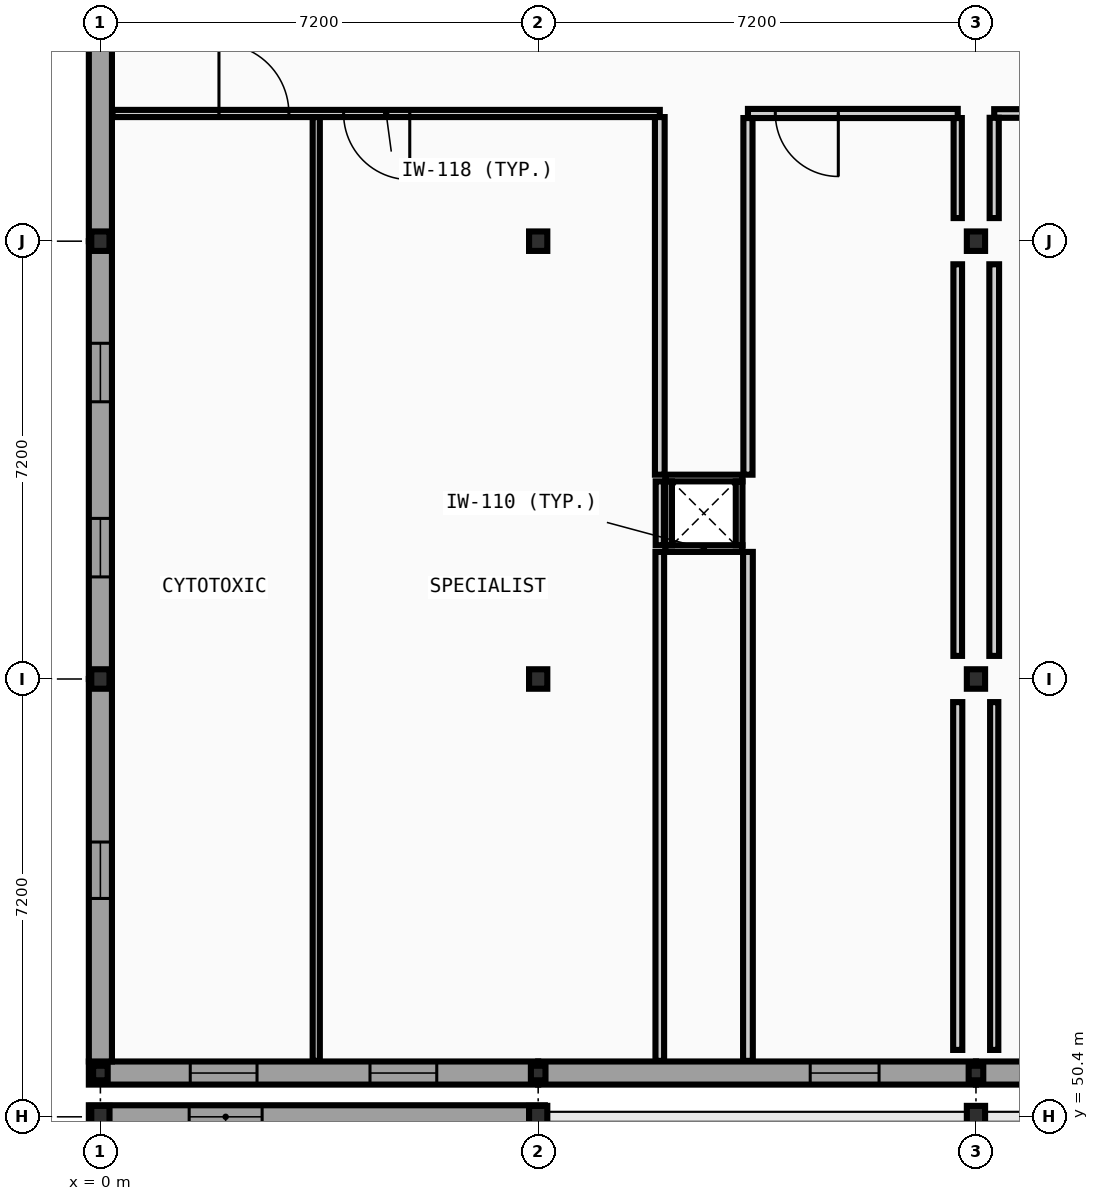
"""IFC4 building model, lengths in metres.
Left out: names, types, materials, properties, quantities, classifications, styles, units other than length and angle.
Written with IfcOpenShell. Run it as: python <this file> out.ifc"""

import sys

from ifc_helpers import new_model, si_unit, direction, frame, frame_2d, origin, origin_2d, place, context, subcontext, project, spatial, rectangle, i_section, extrude, element, fill, save


model = new_model("IFC4")
c1 = context("Model", 3, precision=1e-05, world=origin(), true_north=direction((0.0, 1.0)))
c2 = subcontext(c1, "Body", "Model", "MODEL_VIEW")
j1 = project(units=[si_unit("LENGTHUNIT", "METRE"), si_unit("PLANEANGLEUNIT", "RADIAN")], contexts=[c1])
p1 = place(None, origin())
s1 = spatial("IfcSite", under=j1, at=p1, CompositionType="ELEMENT")
p2 = place(p1, origin())
s2 = spatial("IfcBuilding", under=s1, at=p2, CompositionType="ELEMENT")
p3 = place(p2, frame((0.0, 0.0, 9.6)))
s3 = spatial("IfcBuildingStorey", under=s2, at=p3, CompositionType="ELEMENT", Elevation=9.6)
p4 = place(p3, frame((0.0, 50.4, 0.0), z_axis=(0.0, 0.0, 1.0), x_axis=(1.0, 0.0, 0.0)))
e1 = element("IfcColumn", 1, at=p4, inside=s3, PredefinedType="COLUMN", context=c2, shape_type="SweptSolid", body=[
    extrude(i_section(OverallWidth=0.3, OverallDepth=0.36, WebThickness=0.012, FlangeThickness=0.022, FilletRadius=0.027, at=origin_2d()), origin(), (0.0, 0.0, 1.0), 4.4),
])
p5 = place(p3, frame((0.0, 51.12, 0.0), z_axis=(0.0, 0.0, 1.0), x_axis=(1.0, 0.0, 0.0)))
e2 = element("IfcColumn", 2, at=p5, inside=s3, PredefinedType="COLUMN", context=c2, shape_type="SweptSolid", body=[
    extrude(i_section(OverallWidth=0.24, OverallDepth=0.24, WebThickness=0.01, FlangeThickness=0.017, FilletRadius=0.021, at=origin_2d()), origin(), (0.0, 0.0, 1.0), 4.4),
])
for number, where, z_axis, x_axis in (
    (3, (0.0, 57.6, 0.0), (0.0, 0.0, 1.0), (1.0, 0.0, 0.0)),
    (4, (0.0, 64.8, 0.0), (0.0, 0.0, 1.0), (1.0, 0.0, 0.0)),
):
    element("IfcColumn", number, at=place(p3, frame(where, z_axis=z_axis, x_axis=x_axis)), inside=s3, PredefinedType="COLUMN", context=c2, shape_type="SweptSolid", body=[
        extrude(i_section(OverallWidth=0.3, OverallDepth=0.32, WebThickness=0.011, FlangeThickness=0.021, FilletRadius=0.027, at=origin_2d()), origin(), (0.0, 0.0, 1.0), 4.4),
    ])
p6 = place(p3, frame((7.2, 50.4, 0.0), z_axis=(0.0, 0.0, 1.0), x_axis=(1.0, 0.0, 0.0)))
e5 = element("IfcColumn", 5, at=p6, inside=s3, PredefinedType="COLUMN", context=c2, shape_type="SweptSolid", body=[
    extrude(i_section(OverallWidth=0.3, OverallDepth=0.36, WebThickness=0.012, FlangeThickness=0.022, FilletRadius=0.027, at=origin_2d()), origin(), (0.0, 0.0, 1.0), 4.4),
])
p7 = place(p3, frame((7.2, 51.12, 0.0), z_axis=(0.0, 0.0, 1.0), x_axis=(1.0, 0.0, 0.0)))
e6 = element("IfcColumn", 6, at=p7, inside=s3, PredefinedType="COLUMN", context=c2, shape_type="SweptSolid", body=[
    extrude(i_section(OverallWidth=0.24, OverallDepth=0.24, WebThickness=0.01, FlangeThickness=0.017, FilletRadius=0.021, at=origin_2d()), origin(), (0.0, 0.0, 1.0), 4.4),
])
for number, where, z_axis, x_axis in (
    (7, (7.2, 57.6, 0.0), (0.0, 0.0, 1.0), (1.0, 0.0, 0.0)),
    (8, (7.2, 64.8, 0.0), (0.0, 0.0, 1.0), (1.0, 0.0, 0.0)),
):
    element("IfcColumn", number, at=place(p3, frame(where, z_axis=z_axis, x_axis=x_axis)), inside=s3, PredefinedType="COLUMN", context=c2, shape_type="SweptSolid", body=[
        extrude(i_section(OverallWidth=0.3, OverallDepth=0.32, WebThickness=0.011, FlangeThickness=0.021, FilletRadius=0.027, at=origin_2d()), origin(), (0.0, 0.0, 1.0), 4.4),
    ])
p8 = place(p3, frame((14.4, 50.4, 0.0), z_axis=(0.0, 0.0, 1.0), x_axis=(1.0, 0.0, 0.0)))
e9 = element("IfcColumn", 9, at=p8, inside=s3, PredefinedType="COLUMN", context=c2, shape_type="SweptSolid", body=[
    extrude(i_section(OverallWidth=0.3, OverallDepth=0.36, WebThickness=0.012, FlangeThickness=0.022, FilletRadius=0.027, at=origin_2d()), origin(), (0.0, 0.0, 1.0), 4.4),
])
p9 = place(p3, frame((14.4, 51.12, 0.0), z_axis=(0.0, 0.0, 1.0), x_axis=(1.0, 0.0, 0.0)))
e10 = element("IfcColumn", 10, at=p9, inside=s3, PredefinedType="COLUMN", context=c2, shape_type="SweptSolid", body=[
    extrude(i_section(OverallWidth=0.24, OverallDepth=0.24, WebThickness=0.01, FlangeThickness=0.017, FilletRadius=0.021, at=origin_2d()), origin(), (0.0, 0.0, 1.0), 4.4),
])
for number, where, z_axis, x_axis in (
    (11, (14.4, 57.6, 0.0), (0.0, 0.0, 1.0), (1.0, 0.0, 0.0)),
    (12, (14.4, 64.8, 0.0), (0.0, 0.0, 1.0), (1.0, 0.0, 0.0)),
):
    element("IfcColumn", number, at=place(p3, frame(where, z_axis=z_axis, x_axis=x_axis)), inside=s3, PredefinedType="COLUMN", context=c2, shape_type="SweptSolid", body=[
        extrude(i_section(OverallWidth=0.3, OverallDepth=0.32, WebThickness=0.011, FlangeThickness=0.021, FilletRadius=0.027, at=origin_2d()), origin(), (0.0, 0.0, 1.0), 4.4),
    ])
p10 = place(p3, frame((7.31, 50.4, 0.0), z_axis=(0.0, 0.0, 1.0), x_axis=(-1.0, 0.0, 0.0)))
e13 = element("IfcWall", 13, at=p10, inside=s3, PredefinedType="STANDARD", context=c2, shape_type="SweptSolid", body=[
    extrude(rectangle(XDim=7.5, YDim=0.38, at=frame_2d((3.75, 0.0))), origin(), (0.0, 0.0, 1.0), 3.895),
])
p11 = place(p10, frame((4.65, 0.0, 0.95)))
e14 = element("IfcOpeningElement", 14, at=p11, cuts=e13, PredefinedType="OPENING", context=c2, shape_type="SweptSolid", body=[
    extrude(rectangle(XDim=1.2, YDim=1.296, at=frame_2d((0.6, 0.648))), frame((0.0, 0.2, 0.0), z_axis=(0.0, -1.0, 0.0), x_axis=(1.0, 0.0, 0.0)), (0.0, 0.0, 1.0), 0.4),
])
p12 = place(p3, frame((-0.19, 51.12, 0.0), z_axis=(0.0, 0.0, 1.0), x_axis=(1.0, 0.0, 0.0)))
e15 = element("IfcWall", 15, at=p12, inside=s3, PredefinedType="STANDARD", context=c2, shape_type="SweptSolid", body=[
    extrude(rectangle(XDim=7.39, YDim=0.38, at=frame_2d((3.695, 0.0))), origin(), (0.0, 0.0, 1.0), 3.875),
])
p13 = place(p12, frame((1.668, 0.0, 0.95)))
e16 = element("IfcOpeningElement", 16, at=p13, cuts=e15, PredefinedType="OPENING", context=c2, shape_type="SweptSolid", body=[
    extrude(rectangle(XDim=1.098, YDim=1.26, at=frame_2d((0.549, 0.63))), frame((0.0, 0.2, 0.0), z_axis=(0.0, -1.0, 0.0), x_axis=(1.0, 0.0, 0.0)), (0.0, 0.0, 1.0), 0.4),
])
p14 = place(p12, frame((4.624, 0.0, 0.95)))
e17 = element("IfcOpeningElement", 17, at=p14, cuts=e15, PredefinedType="OPENING", context=c2, shape_type="SweptSolid", body=[
    extrude(rectangle(XDim=1.098, YDim=1.26, at=frame_2d((0.549, 0.63))), frame((0.0, 0.2, 0.0), z_axis=(0.0, -1.0, 0.0), x_axis=(1.0, 0.0, 0.0)), (0.0, 0.0, 1.0), 0.4),
])
p15 = place(p3, frame((7.2, 51.12, 0.0), z_axis=(0.0, 0.0, 1.0), x_axis=(1.0, 0.0, 0.0)))
e18 = element("IfcWall", 18, at=p15, inside=s3, PredefinedType="STANDARD", context=c2, shape_type="SweptSolid", body=[
    extrude(rectangle(XDim=7.2, YDim=0.38, at=frame_2d((3.6, 0.0))), origin(), (0.0, 0.0, 1.0), 3.875),
])
p16 = place(p15, frame((4.474, 0.0, 0.95)))
e19 = element("IfcOpeningElement", 19, at=p16, cuts=e18, PredefinedType="OPENING", context=c2, shape_type="SweptSolid", body=[
    extrude(rectangle(XDim=1.132, YDim=1.26, at=frame_2d((0.566, 0.63))), frame((0.0, 0.2, 0.0), z_axis=(0.0, -1.0, 0.0), x_axis=(1.0, 0.0, 0.0)), (0.0, 0.0, 1.0), 0.4),
])
p17 = place(p3, frame((14.4, 51.12, 0.0), z_axis=(0.0, 0.0, 1.0), x_axis=(1.0, 0.0, 0.0)))
e20 = element("IfcWall", 20, at=p17, inside=s3, PredefinedType="STANDARD", context=c2, shape_type="SweptSolid", body=[
    extrude(rectangle(XDim=7.2, YDim=0.38, at=frame_2d((3.6, 0.0))), origin(), (0.0, 0.0, 1.0), 3.875),
])
p18 = place(p17, frame((1.577, 0.0, 0.95)))
e21 = element("IfcOpeningElement", 21, at=p18, cuts=e20, PredefinedType="OPENING", context=c2, shape_type="SweptSolid", body=[
    extrude(rectangle(XDim=1.166, YDim=1.26, at=frame_2d((0.583, 0.63))), frame((0.0, 0.2, 0.0), z_axis=(0.0, -1.0, 0.0), x_axis=(1.0, 0.0, 0.0)), (0.0, 0.0, 1.0), 0.4),
])
p19 = place(p3, frame((0.0, 57.6, 0.0), z_axis=(0.0, 0.0, 1.0), x_axis=(0.0, -1.0, 0.0)))
e22 = element("IfcWall", 22, at=p19, inside=s3, PredefinedType="STANDARD", context=c2, shape_type="SweptSolid", body=[
    extrude(rectangle(XDim=6.29, YDim=0.38, at=frame_2d((3.145, 0.0))), origin(), (0.0, 0.0, 1.0), 3.865),
])
p20 = place(p19, frame((2.681, 0.0, 0.95)))
e23 = element("IfcOpeningElement", 23, at=p20, cuts=e22, PredefinedType="OPENING", context=c2, shape_type="SweptSolid", body=[
    extrude(rectangle(XDim=0.928, YDim=1.296, at=frame_2d((0.464, 0.648))), frame((0.0, 0.2, 0.0), z_axis=(0.0, -1.0, 0.0), x_axis=(1.0, 0.0, 0.0)), (0.0, 0.0, 1.0), 0.4),
])
p21 = place(p3, frame((0.0, 64.8, 0.0), z_axis=(0.0, 0.0, 1.0), x_axis=(0.0, -1.0, 0.0)))
e24 = element("IfcWall", 24, at=p21, inside=s3, PredefinedType="STANDARD", context=c2, shape_type="SweptSolid", body=[
    extrude(rectangle(XDim=7.2, YDim=0.38, at=frame_2d((3.6, 0.0))), origin(), (0.0, 0.0, 1.0), 3.885),
])
p22 = place(p21, frame((1.679, 0.0, 0.95)))
e25 = element("IfcOpeningElement", 25, at=p22, cuts=e24, PredefinedType="OPENING", context=c2, shape_type="SweptSolid", body=[
    extrude(rectangle(XDim=0.962, YDim=1.296, at=frame_2d((0.481, 0.648))), frame((0.0, 0.2, 0.0), z_axis=(0.0, -1.0, 0.0), x_axis=(1.0, 0.0, 0.0)), (0.0, 0.0, 1.0), 0.4),
])
p23 = place(p21, frame((4.559, 0.0, 0.95)))
e26 = element("IfcOpeningElement", 26, at=p23, cuts=e24, PredefinedType="OPENING", context=c2, shape_type="SweptSolid", body=[
    extrude(rectangle(XDim=0.962, YDim=1.296, at=frame_2d((0.481, 0.648))), frame((0.0, 0.2, 0.0), z_axis=(0.0, -1.0, 0.0), x_axis=(1.0, 0.0, 0.0)), (0.0, 0.0, 1.0), 0.4),
])
p24 = place(p3, frame((0.0, 72.0, 0.0), z_axis=(0.0, 0.0, 1.0), x_axis=(0.0, -1.0, 0.0)))
e27 = element("IfcWall", 27, at=p24, inside=s3, PredefinedType="STANDARD", context=c2, shape_type="SweptSolid", body=[
    extrude(rectangle(XDim=7.2, YDim=0.38, at=frame_2d((3.6, 0.0))), origin(), (0.0, 0.0, 1.0), 3.885),
])
for number, where, z_axis, x_axis in (
    (28, (9.29, 59.745, 0.0), (0.0, 0.0, 1.0), (1.0, 0.0, 0.0)),
    (29, (9.29, 60.905, 0.0), (0.0, 0.0, 1.0), (1.0, 0.0, 0.0)),
):
    element("IfcWall", number, at=place(p3, frame(where, z_axis=z_axis, x_axis=x_axis)), inside=s3, PredefinedType="PARTITIONING", context=c2, shape_type="SweptSolid", body=[
        extrude(rectangle(XDim=1.27, YDim=0.11, at=frame_2d((0.635, 0.0))), origin(), (0.0, 0.0, 1.0), 4.2),
    ])
for number, where, z_axis, x_axis in (
    (30, (9.345, 59.8, 0.0), (0.0, 0.0, 1.0), (0.0, 1.0, 0.0)),
    (31, (10.505, 59.8, 0.0), (0.0, 0.0, 1.0), (0.0, 1.0, 0.0)),
):
    element("IfcWall", number, at=place(p3, frame(where, z_axis=z_axis, x_axis=x_axis)), inside=s3, PredefinedType="PARTITIONING", context=c2, shape_type="SweptSolid", body=[
        extrude(rectangle(XDim=1.05, YDim=0.11, at=frame_2d((0.525, 0.0))), origin(), (0.0, 0.0, 1.0), 4.2),
    ])
p25 = place(p3, frame((0.2, 66.9, 0.0), z_axis=(0.0, 0.0, 1.0), x_axis=(1.0, 0.0, 0.0)))
e32 = element("IfcWall", 32, at=p25, inside=s3, PredefinedType="PARTITIONING", context=c2, shape_type="SweptSolid", body=[
    extrude(rectangle(XDim=9.0, YDim=0.118, at=frame_2d((4.5, 0.0))), origin(), (0.0, 0.0, 1.0), 4.2),
])
p26 = place(p25, frame((1.75, 0.0, 0.0)))
e33 = element("IfcOpeningElement", 33, at=p26, cuts=e32, PredefinedType="OPENING", context=c2, shape_type="SweptSolid", body=[
    extrude(rectangle(XDim=1.15, YDim=2.15, at=frame_2d((0.575, 1.075))), frame((0.0, 0.069, 0.0), z_axis=(0.0, -1.0, 0.0), x_axis=(1.0, 0.0, 0.0)), (0.0, 0.0, 1.0), 0.138),
])
p27 = place(p25, frame((3.8, 0.0, 0.0)))
e34 = element("IfcOpeningElement", 34, at=p27, cuts=e32, PredefinedType="OPENING", context=c2, shape_type="SweptSolid", body=[
    extrude(rectangle(XDim=1.088, YDim=2.152, at=frame_2d((0.544, 1.076))), frame((0.0, 0.069, 0.0), z_axis=(0.0, -1.0, 0.0), x_axis=(1.0, 0.0, 0.0)), (0.0, 0.0, 1.0), 0.138),
])
p28 = place(p3, frame((10.65, 66.9, 0.0), z_axis=(0.0, 0.0, 1.0), x_axis=(1.0, 0.0, 0.0)))
e35 = element("IfcWall", 35, at=p28, inside=s3, PredefinedType="PARTITIONING", context=c2, shape_type="SweptSolid", body=[
    extrude(rectangle(XDim=3.45, YDim=0.15, at=frame_2d((1.725, 0.0))), origin(), (0.0, 0.0, 1.0), 4.2),
])
p29 = place(p28, frame((0.45, 0.0, 0.0)))
e36 = element("IfcOpeningElement", 36, at=p29, cuts=e35, PredefinedType="OPENING", context=c2, shape_type="SweptSolid", body=[
    extrude(rectangle(XDim=1.036, YDim=2.152, at=frame_2d((0.518, 1.076))), frame((0.0, 0.085, 0.0), z_axis=(0.0, -1.0, 0.0), x_axis=(1.0, 0.0, 0.0)), (0.0, 0.0, 1.0), 0.17),
])
p30 = place(p3, frame((14.7, 66.9, 0.0), z_axis=(0.0, 0.0, 1.0), x_axis=(1.0, 0.0, 0.0)))
e37 = element("IfcWall", 37, at=p30, inside=s3, PredefinedType="PARTITIONING", context=c2, shape_type="SweptSolid", body=[
    extrude(rectangle(XDim=13.9, YDim=0.142, at=frame_2d((6.95, 0.0))), origin(), (0.0, 0.0, 1.0), 4.2),
])
p31 = place(p30, frame((10.293, 0.0, 0.0)))
e38 = element("IfcOpeningElement", 38, at=p31, cuts=e37, PredefinedType="OPENING", context=c2, shape_type="SweptSolid", body=[
    extrude(rectangle(XDim=1.114, YDim=2.152, at=frame_2d((0.557, 1.076))), frame((0.0, 0.081, 0.0), z_axis=(0.0, -1.0, 0.0), x_axis=(1.0, 0.0, 0.0)), (0.0, 0.0, 1.0), 0.162),
])
p32 = place(p30, frame((3.33, 0.0, 0.0)))
e39 = element("IfcOpeningElement", 39, at=p32, cuts=e37, PredefinedType="OPENING", context=c2, shape_type="SweptSolid", body=[
    extrude(rectangle(XDim=1.14, YDim=2.152, at=frame_2d((0.57, 1.076))), frame((0.0, 0.081, 0.0), z_axis=(0.0, -1.0, 0.0), x_axis=(1.0, 0.0, 0.0)), (0.0, 0.0, 1.0), 0.162),
])
p33 = place(p3, frame((3.55, 51.32, 0.0), z_axis=(0.0, 0.0, 1.0), x_axis=(0.0, 1.0, 0.0)))
e40 = element("IfcWall", 40, at=p33, inside=s3, PredefinedType="PARTITIONING", context=c2, shape_type="SweptSolid", body=[
    extrude(rectangle(XDim=15.521, YDim=0.118, at=frame_2d((7.76, 0.0))), origin(), (0.0, 0.0, 1.0), 4.2),
])
p34 = place(p3, frame((9.2, 51.32, 0.0), z_axis=(0.0, 0.0, 1.0), x_axis=(0.0, 1.0, 0.0)))
e41 = element("IfcWall", 41, at=p34, inside=s3, PredefinedType="PARTITIONING", context=c2, shape_type="SweptSolid", body=[
    extrude(rectangle(XDim=8.37, YDim=0.142, at=frame_2d((4.185, 0.0))), origin(), (0.0, 0.0, 1.0), 4.2),
])
p35 = place(p3, frame((9.2, 59.8, 0.0), z_axis=(0.0, 0.0, 1.0), x_axis=(0.0, 1.0, 0.0)))
e42 = element("IfcWall", 42, at=p35, inside=s3, PredefinedType="PARTITIONING", context=c2, shape_type="SweptSolid", body=[
    extrude(rectangle(XDim=1.05, YDim=0.135, at=frame_2d((0.525, 0.0))), origin(), (0.0, 0.0, 1.0), 4.2),
])
p36 = place(p3, frame((9.2, 60.96, 0.0), z_axis=(0.0, 0.0, 1.0), x_axis=(0.0, 1.0, 0.0)))
e43 = element("IfcWall", 43, at=p36, inside=s3, PredefinedType="PARTITIONING", context=c2, shape_type="SweptSolid", body=[
    extrude(rectangle(XDim=5.881, YDim=0.16, at=frame_2d((2.94, 0.0))), origin(), (0.0, 0.0, 1.0), 4.2),
])
p37 = place(p3, frame((10.65, 51.32, 0.0), z_axis=(0.0, 0.0, 1.0), x_axis=(0.0, 1.0, 0.0)))
e44 = element("IfcWall", 44, at=p37, inside=s3, PredefinedType="PARTITIONING", context=c2, shape_type="SweptSolid", body=[
    extrude(rectangle(XDim=8.37, YDim=0.16, at=frame_2d((4.185, 0.0))), origin(), (0.0, 0.0, 1.0), 4.2),
])
p38 = place(p3, frame((10.65, 60.96, 0.0), z_axis=(0.0, 0.0, 1.0), x_axis=(0.0, 1.0, 0.0)))
e45 = element("IfcWall", 45, at=p38, inside=s3, PredefinedType="PARTITIONING", context=c2, shape_type="SweptSolid", body=[
    extrude(rectangle(XDim=5.865, YDim=0.15, at=frame_2d((2.933, 0.0))), origin(), (0.0, 0.0, 1.0), 4.2),
])
p39 = place(p3, frame((14.1, 51.5, 0.0), z_axis=(0.0, 0.0, 1.0), x_axis=(0.0, 1.0, 0.0)))
e46 = element("IfcWall", 46, at=p39, inside=s3, PredefinedType="PARTITIONING", context=c2, shape_type="SweptSolid", body=[
    extrude(rectangle(XDim=5.72, YDim=0.15, at=frame_2d((2.86, 0.0))), origin(), (0.0, 0.0, 1.0), 3.875),
])
p40 = place(p3, frame((14.1, 57.98, 0.0), z_axis=(0.0, 0.0, 1.0), x_axis=(0.0, 1.0, 0.0)))
e47 = element("IfcWall", 47, at=p40, inside=s3, PredefinedType="PARTITIONING", context=c2, shape_type="SweptSolid", body=[
    extrude(rectangle(XDim=6.44, YDim=0.142, at=frame_2d((3.22, 0.0))), origin(), (0.0, 0.0, 1.0), 3.895),
])
p41 = place(p3, frame((14.1, 65.18, 0.0), z_axis=(0.0, 0.0, 1.0), x_axis=(0.0, 1.0, 0.0)))
e48 = element("IfcWall", 48, at=p41, inside=s3, PredefinedType="PARTITIONING", context=c2, shape_type="SweptSolid", body=[
    extrude(rectangle(XDim=1.645, YDim=0.135, at=frame_2d((0.823, 0.0))), origin(), (0.0, 0.0, 1.0), 4.2),
])
p42 = place(p3, frame((14.7, 51.5, 0.0), z_axis=(0.0, 0.0, 1.0), x_axis=(0.0, 1.0, 0.0)))
e49 = element("IfcWall", 49, at=p42, inside=s3, PredefinedType="PARTITIONING", context=c2, shape_type="SweptSolid", body=[
    extrude(rectangle(XDim=5.72, YDim=0.135, at=frame_2d((2.86, 0.0))), origin(), (0.0, 0.0, 1.0), 4.2),
])
p43 = place(p3, frame((14.7, 57.98, 0.0), z_axis=(0.0, 0.0, 1.0), x_axis=(0.0, 1.0, 0.0)))
e50 = element("IfcWall", 50, at=p43, inside=s3, PredefinedType="PARTITIONING", context=c2, shape_type="SweptSolid", body=[
    extrude(rectangle(XDim=6.44, YDim=0.16, at=frame_2d((3.22, 0.0))), origin(), (0.0, 0.0, 1.0), 3.895),
])
p44 = place(p3, frame((14.7, 65.18, 0.0), z_axis=(0.0, 0.0, 1.0), x_axis=(0.0, 1.0, 0.0)))
e51 = element("IfcWall", 51, at=p44, inside=s3, PredefinedType="PARTITIONING", context=c2, shape_type="SweptSolid", body=[
    extrude(rectangle(XDim=1.649, YDim=0.15, at=frame_2d((0.825, 0.0))), origin(), (0.0, 0.0, 1.0), 3.895),
])
p45 = place(p11, origin())
e52 = element("IfcWindow", 52, at=p45, inside=s3, PartitioningType="SINGLE_PANEL", PredefinedType="WINDOW", context=c2, shape_type="SweptSolid", body=[
    extrude(rectangle(XDim=1.2, YDim=1.296, at=frame_2d((0.6, 0.648))), frame((0.0, 0.03, 0.0), z_axis=(0.0, -1.0, 0.0), x_axis=(1.0, 0.0, 0.0)), (0.0, 0.0, 1.0), 0.06),
])
fill(e14, e52)
p46 = place(p13, origin())
e53 = element("IfcWindow", 53, at=p46, inside=s3, PartitioningType="SINGLE_PANEL", PredefinedType="WINDOW", context=c2, shape_type="SweptSolid", body=[
    extrude(rectangle(XDim=1.098, YDim=1.26, at=frame_2d((0.549, 0.63))), frame((0.0, 0.03, 0.0), z_axis=(0.0, -1.0, 0.0), x_axis=(1.0, 0.0, 0.0)), (0.0, 0.0, 1.0), 0.06),
])
fill(e16, e53)
p47 = place(p14, origin())
e54 = element("IfcWindow", 54, at=p47, inside=s3, PartitioningType="SINGLE_PANEL", PredefinedType="WINDOW", context=c2, shape_type="SweptSolid", body=[
    extrude(rectangle(XDim=1.098, YDim=1.26, at=frame_2d((0.549, 0.63))), frame((0.0, 0.03, 0.0), z_axis=(0.0, -1.0, 0.0), x_axis=(1.0, 0.0, 0.0)), (0.0, 0.0, 1.0), 0.06),
])
fill(e17, e54)
p48 = place(p16, origin())
e55 = element("IfcWindow", 55, at=p48, inside=s3, PartitioningType="SINGLE_PANEL", PredefinedType="WINDOW", context=c2, shape_type="SweptSolid", body=[
    extrude(rectangle(XDim=1.132, YDim=1.26, at=frame_2d((0.566, 0.63))), frame((0.0, 0.03, 0.0), z_axis=(0.0, -1.0, 0.0), x_axis=(1.0, 0.0, 0.0)), (0.0, 0.0, 1.0), 0.06),
])
fill(e19, e55)
p49 = place(p20, origin())
e56 = element("IfcWindow", 56, at=p49, inside=s3, PartitioningType="SINGLE_PANEL", PredefinedType="WINDOW", context=c2, shape_type="SweptSolid", body=[
    extrude(rectangle(XDim=0.928, YDim=1.296, at=frame_2d((0.464, 0.648))), frame((0.0, 0.03, 0.0), z_axis=(0.0, -1.0, 0.0), x_axis=(1.0, 0.0, 0.0)), (0.0, 0.0, 1.0), 0.06),
])
fill(e23, e56)
p50 = place(p22, origin())
e57 = element("IfcWindow", 57, at=p50, inside=s3, PartitioningType="SINGLE_PANEL", PredefinedType="WINDOW", context=c2, shape_type="SweptSolid", body=[
    extrude(rectangle(XDim=0.962, YDim=1.296, at=frame_2d((0.481, 0.648))), frame((0.0, 0.03, 0.0), z_axis=(0.0, -1.0, 0.0), x_axis=(1.0, 0.0, 0.0)), (0.0, 0.0, 1.0), 0.06),
])
fill(e25, e57)
p51 = place(p23, origin())
e58 = element("IfcWindow", 58, at=p51, inside=s3, PartitioningType="SINGLE_PANEL", PredefinedType="WINDOW", context=c2, shape_type="SweptSolid", body=[
    extrude(rectangle(XDim=0.962, YDim=1.296, at=frame_2d((0.481, 0.648))), frame((0.0, 0.03, 0.0), z_axis=(0.0, -1.0, 0.0), x_axis=(1.0, 0.0, 0.0)), (0.0, 0.0, 1.0), 0.06),
])
fill(e26, e58)
p52 = place(p26, origin())
e59 = element("IfcDoor", 59, at=p52, inside=s3, OperationType="SINGLE_SWING_LEFT", PredefinedType="DOOR", context=c2, shape_type="SweptSolid", body=[
    extrude(rectangle(XDim=1.15, YDim=2.15, at=frame_2d((0.575, 1.075))), frame((0.0, 0.025, 0.0), z_axis=(0.0, -1.0, 0.0), x_axis=(1.0, 0.0, 0.0)), (0.0, 0.0, 1.0), 0.05),
])
fill(e33, e59)
p53 = place(p29, origin())
e60 = element("IfcDoor", 60, at=p53, inside=s3, OperationType="SINGLE_SWING_RIGHT", PredefinedType="DOOR", context=c2, shape_type="SweptSolid", body=[
    extrude(rectangle(XDim=1.036, YDim=2.152, at=frame_2d((0.518, 1.076))), frame((0.0, 0.025, 0.0), z_axis=(0.0, -1.0, 0.0), x_axis=(1.0, 0.0, 0.0)), (0.0, 0.0, 1.0), 0.05),
])
fill(e36, e60)
p54 = place(p27, origin())
e61 = element("IfcDoor", 61, at=p54, inside=s3, OperationType="SINGLE_SWING_RIGHT", PredefinedType="DOOR", context=c2, shape_type="SweptSolid", body=[
    extrude(rectangle(XDim=1.088, YDim=2.152, at=frame_2d((0.544, 1.076))), frame((0.0, 0.025, 0.0), z_axis=(0.0, -1.0, 0.0), x_axis=(1.0, 0.0, 0.0)), (0.0, 0.0, 1.0), 0.05),
])
fill(e34, e61)
save(model, sys.argv[1])
